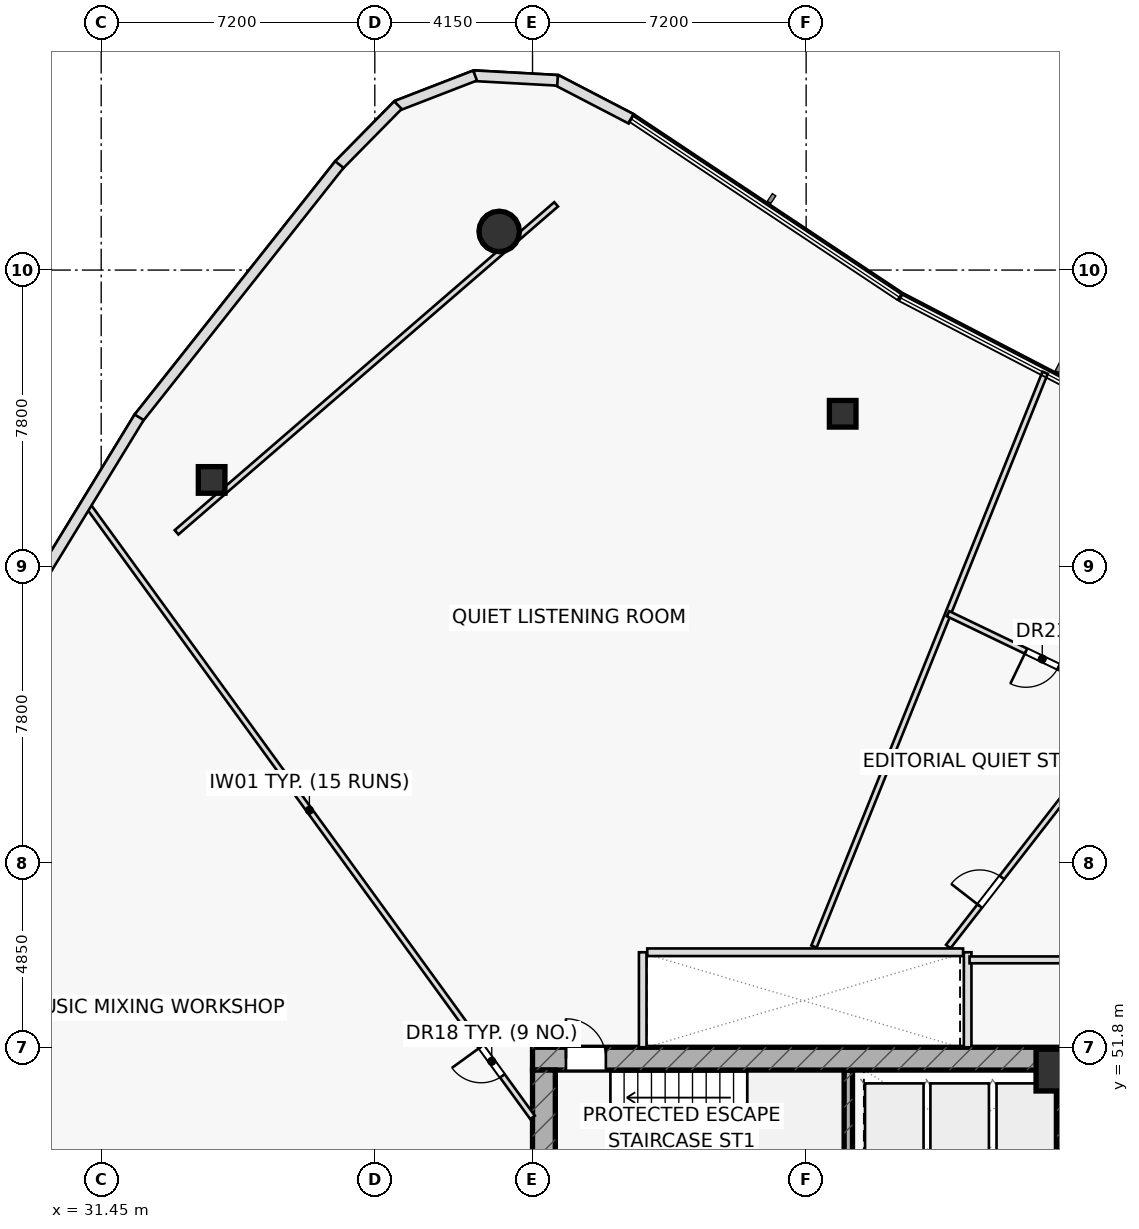
"""IFC4 building model, lengths in metres.
Left out: names, types, materials, properties, quantities, classifications, styles, units other than length and angle.
Written with IfcOpenShell. Run it as: python <this file> out.ifc"""

import sys

from ifc_helpers import new_model, si_unit, direction, frame, frame_2d, origin, origin_2d, place, context, subcontext, project, spatial, rectangle, hollow_rectangle, hollow_circle, extrude, element, fill, save


model = new_model("IFC4")
c1 = context("Model", 3, precision=1e-05, world=origin(), true_north=direction((0.0, 1.0)))
c2 = subcontext(c1, "Body", "Model", "MODEL_VIEW")
j1 = project(units=[si_unit("LENGTHUNIT", "METRE"), si_unit("PLANEANGLEUNIT", "RADIAN")], contexts=[c1])
p1 = place(None, origin())
s1 = spatial("IfcSite", under=j1, at=p1, CompositionType="ELEMENT")
p2 = place(p1, origin())
s2 = spatial("IfcBuilding", under=s1, at=p2, CompositionType="ELEMENT")
p3 = place(p2, frame((0.0, 0.0, 62.7)))
s3 = spatial("IfcBuildingStorey", under=s2, at=p3, CompositionType="ELEMENT", Elevation=62.7)
p4 = place(p3, frame((51.11, 48.1, 0.0), z_axis=(0.0, 0.0, 1.0), x_axis=(0.0, 1.0, 0.0)))
e1 = element("IfcWall", 1, at=p4, inside=s3, PredefinedType="SHEAR", context=c2, shape_type="SweptSolid", body=[
    extrude(rectangle(XDim=3.1, YDim=0.22, at=frame_2d((1.55, 0.0))), origin(), (0.0, 0.0, 1.0), 3.6),
])
p5 = place(p3, frame((42.8, 51.5, 0.0), z_axis=(0.0, 0.0, 1.0), x_axis=(1.0, 0.0, 0.0)))
e2 = element("IfcWall", 2, at=p5, inside=s3, PredefinedType="SHEAR", context=c2, shape_type="SweptSolid", body=[
    extrude(rectangle(XDim=14.4, YDim=0.6, at=frame_2d((7.2, 0.0))), origin(), (0.0, 0.0, 1.0), 3.6),
])
p6 = place(p5, frame((0.88, 0.0, 0.0)))
e3 = element("IfcOpeningElement", 3, at=p6, cuts=e2, PredefinedType="OPENING", context=c2, shape_type="SweptSolid", body=[
    extrude(rectangle(XDim=1.05, YDim=2.2, at=frame_2d((0.525, 1.1))), frame((0.0, 0.31, 0.0), z_axis=(0.0, -1.0, 0.0), x_axis=(1.0, 0.0, 0.0)), (0.0, 0.0, 1.0), 0.62),
])
p7 = place(p3, frame((43.1, 38.8, 0.0), z_axis=(0.0, 0.0, 1.0), x_axis=(0.0, 1.0, 0.0)))
e4 = element("IfcWall", 4, at=p7, inside=s3, PredefinedType="SHEAR", context=c2, shape_type="SweptSolid", body=[
    extrude(rectangle(XDim=12.4, YDim=0.6, at=frame_2d((6.2, 0.0))), origin(), (0.0, 0.0, 1.0), 3.6),
])
p8 = place(p3, frame((56.9, 38.8, 0.0), z_axis=(0.0, 0.0, 1.0), x_axis=(0.0, 1.0, 0.0)))
e5 = element("IfcWall", 5, at=p8, inside=s3, PredefinedType="SHEAR", context=c2, shape_type="SweptSolid", body=[
    extrude(rectangle(XDim=12.4, YDim=0.6, at=frame_2d((6.2, 0.0))), origin(), (0.0, 0.0, 1.0), 3.6),
])
p9 = place(p8, frame((3.85, 0.0, 0.0)))
e6 = element("IfcOpeningElement", 6, at=p9, cuts=e5, PredefinedType="OPENING", context=c2, shape_type="SweptSolid", body=[
    extrude(rectangle(XDim=1.5, YDim=2.2, at=frame_2d((0.75, 1.1))), frame((0.0, 0.31, 0.0), z_axis=(0.0, -1.0, 0.0), x_axis=(1.0, 0.0, 0.0)), (0.0, 0.0, 1.0), 0.62),
])
p10 = place(p3, frame((56.6, 51.2, 0.0), z_axis=(0.0, 0.0, 1.0), x_axis=(1.0, 0.0, 0.0)))
e7 = element("IfcColumn", 7, at=p10, inside=s3, PredefinedType="COLUMN", context=c2, shape_type="SweptSolid", body=[
    extrude(rectangle(XDim=1.1, YDim=1.1, at=origin_2d()), origin(), (0.0, 0.0, 1.0), 3.6),
])
p11 = place(p3, frame((41.923, 73.266, 0.0), z_axis=(0.0, 0.0, 1.0), x_axis=(1.0, 0.0, 0.0)))
e8 = element("IfcColumn", 8, at=p11, inside=s3, PredefinedType="COLUMN", context=c2, shape_type="SweptSolid", body=[
    extrude(hollow_circle(Radius=0.533, WallThickness=0.045, at=origin_2d()), origin(), (0.0, 0.0, 1.0), 3.6),
])
for number, where, z_axis, x_axis in (
    (9, (34.356, 66.728, 0.0), (0.0, 0.0, 1.0), (1.0, 0.0, 0.0)),
    (10, (50.962, 68.469, 0.0), (0.0, 0.0, 1.0), (1.0, 0.0, 0.0)),
):
    element("IfcColumn", number, at=place(p3, frame(where, z_axis=z_axis, x_axis=x_axis)), inside=s3, PredefinedType="COLUMN", context=c2, shape_type="SweptSolid", body=[
        extrude(hollow_rectangle(XDim=0.7, YDim=0.7, WallThickness=0.04, at=origin_2d()), origin(), (0.0, 0.0, 1.0), 3.6),
    ])
for number, where, z_axis, x_axis in (
    (11, (45.7, 51.8, 0.0), (0.0, 0.0, 1.0), (0.0, 1.0, 0.0)),
    (12, (54.25, 51.8, 0.0), (0.0, 0.0, 1.0), (0.0, 1.0, 0.0)),
):
    element("IfcWall", number, at=place(p3, frame(where, z_axis=z_axis, x_axis=x_axis)), inside=s3, PredefinedType="PARTITIONING", context=c2, shape_type="SweptSolid", body=[
        extrude(rectangle(XDim=2.5, YDim=0.2, at=frame_2d((1.25, 0.0))), origin(), (0.0, 0.0, 1.0), 3.6),
    ])
p12 = place(p3, frame((43.421, 73.979, 0.0), z_axis=(0.0, 0.0, 1.0), x_axis=(-0.756659135409, -0.653809569218, 0.0)))
e13 = element("IfcWall", 13, at=p12, inside=s3, PredefinedType="PARTITIONING", context=c2, shape_type="SweptSolid", body=[
    extrude(rectangle(XDim=13.2, YDim=0.15, at=frame_2d((6.6, 0.0))), origin(), (0.0, 0.0, 1.0), 2.975),
])
p13 = place(p3, frame((42.8, 49.955, 0.0), z_axis=(0.0, 0.0, 1.0), x_axis=(-0.587790891167, 0.809012897463, 0.0)))
e14 = element("IfcWall", 14, at=p13, inside=s3, PredefinedType="PARTITIONING", context=c2, shape_type="SweptSolid", body=[
    extrude(rectangle(XDim=19.979, YDim=0.15, at=frame_2d((9.989, 0.0))), origin(), (0.0, 0.0, 1.0), 2.975),
])
p14 = place(p13, frame((1.35, 0.0, 0.0)))
e15 = element("IfcOpeningElement", 15, at=p14, cuts=e14, PredefinedType="OPENING", context=c2, shape_type="SweptSolid", body=[
    extrude(rectangle(XDim=0.95, YDim=2.05, at=frame_2d((0.475, 1.025))), frame((0.0, 0.085, 0.0), z_axis=(0.0, -1.0, 0.0), x_axis=(1.0, 0.0, 0.0)), (0.0, 0.0, 1.0), 0.17),
])
p15 = place(p3, frame((53.74, 54.45, 0.0), z_axis=(0.0, 0.0, 1.0), x_axis=(0.613423233684, 0.78975435192, 0.0)))
e16 = element("IfcWall", 16, at=p15, inside=s3, PredefinedType="PARTITIONING", context=c2, shape_type="SweptSolid", body=[
    extrude(rectangle(XDim=13.92, YDim=0.15, at=frame_2d((6.96, 0.0))), origin(), (0.0, 0.0, 1.0), 2.975),
])
p16 = place(p15, frame((1.35, 0.0, 0.0)))
e17 = element("IfcOpeningElement", 17, at=p16, cuts=e16, PredefinedType="OPENING", context=c2, shape_type="SweptSolid", body=[
    extrude(rectangle(XDim=0.95, YDim=2.05, at=frame_2d((0.475, 1.025))), frame((0.0, 0.085, 0.0), z_axis=(0.0, -1.0, 0.0), x_axis=(1.0, 0.0, 0.0)), (0.0, 0.0, 1.0), 0.17),
])
p17 = place(p3, frame((50.207, 54.45, 0.0), z_axis=(0.0, 0.0, 1.0), x_axis=(0.373649555397, 0.927569948711, 0.0)))
e18 = element("IfcWall", 18, at=p17, inside=s3, PredefinedType="PARTITIONING", context=c2, shape_type="SweptSolid", body=[
    extrude(rectangle(XDim=16.279, YDim=0.15, at=frame_2d((8.139, 0.0))), origin(), (0.0, 0.0, 1.0), 2.975),
])
p18 = place(p3, frame((58.693, 60.826, 0.0), z_axis=(0.0, 0.0, 1.0), x_axis=(-0.901424681966, 0.432935956861, 0.0)))
e19 = element("IfcWall", 19, at=p18, inside=s3, PredefinedType="PARTITIONING", context=c2, shape_type="SweptSolid", body=[
    extrude(rectangle(XDim=5.5, YDim=0.15, at=frame_2d((2.75, 0.0))), origin(), (0.0, 0.0, 1.0), 2.975),
])
p19 = place(p18, frame((2.275, 0.0, 0.0)))
e20 = element("IfcOpeningElement", 20, at=p19, cuts=e19, PredefinedType="OPENING", context=c2, shape_type="SweptSolid", body=[
    extrude(rectangle(XDim=0.95, YDim=2.05, at=frame_2d((0.475, 1.025))), frame((0.0, 0.085, 0.0), z_axis=(0.0, -1.0, 0.0), x_axis=(1.0, 0.0, 0.0)), (0.0, 0.0, 1.0), 0.17),
])
p20 = place(p3, frame((54.3, 54.1, 0.0), z_axis=(0.0, 0.0, 1.0), x_axis=(1.0, 0.0, 0.0)))
e21 = element("IfcWall", 21, at=p20, inside=s3, PredefinedType="PARTITIONING", context=c2, shape_type="SweptSolid", body=[
    extrude(rectangle(XDim=5.25, YDim=0.18, at=frame_2d((2.625, 0.0))), origin(), (0.0, 0.0, 1.0), 2.975),
])
p21 = place(p3, frame((45.396, 76.229, 0.0), z_axis=(0.0, 0.0, 1.0), x_axis=(-0.88741889112, 0.46096389412, 0.0)))
e22 = element("IfcWall", 22, at=p21, inside=s3, PredefinedType="STANDARD", context=c2, shape_type="SweptSolid", body=[
    extrude(rectangle(XDim=2.214, YDim=0.28, at=frame_2d((1.107, 0.0))), origin(), (0.0, 0.0, 1.0), 3.6),
])
p22 = place(p3, frame((43.459, 77.242, 0.0), z_axis=(0.0, 0.0, 1.0), x_axis=(-0.998487852216, 0.054972802164, 0.0)))
e23 = element("IfcWall", 23, at=p22, inside=s3, PredefinedType="STANDARD", context=c2, shape_type="SweptSolid", body=[
    extrude(rectangle(XDim=2.203, YDim=0.28, at=frame_2d((1.102, 0.0))), origin(), (0.0, 0.0, 1.0), 3.6),
])
p23 = place(p3, frame((41.288, 77.368, 0.0), z_axis=(0.0, 0.0, 1.0), x_axis=(-0.932643913252, -0.360798186075, 0.0)))
e24 = element("IfcWall", 24, at=p23, inside=s3, PredefinedType="STANDARD", context=c2, shape_type="SweptSolid", body=[
    extrude(rectangle(XDim=2.203, YDim=0.28, at=frame_2d((1.101, 0.0))), origin(), (0.0, 0.0, 1.0), 3.6),
])
p24 = place(p3, frame((39.258, 76.59, 0.0), z_axis=(0.0, 0.0, 1.0), x_axis=(-0.70148940443, -0.712679882887, 0.0)))
e25 = element("IfcWall", 25, at=p24, inside=s3, PredefinedType="STANDARD", context=c2, shape_type="SweptSolid", body=[
    extrude(rectangle(XDim=2.225, YDim=0.28, at=frame_2d((1.113, 0.0))), origin(), (0.0, 0.0, 1.0), 3.6),
])
p25 = place(p3, frame((37.717, 75.026, 0.0), z_axis=(0.0, 0.0, 1.0), x_axis=(-0.620830009018, -0.783945214861, 0.0)))
e26 = element("IfcWall", 26, at=p25, inside=s3, PredefinedType="STANDARD", context=c2, shape_type="SweptSolid", body=[
    extrude(rectangle(XDim=8.513, YDim=0.28, at=frame_2d((4.257, 0.0))), origin(), (0.0, 0.0, 1.0), 3.6),
])
p26 = place(p3, frame((32.449, 68.376, 0.0), z_axis=(0.0, 0.0, 1.0), x_axis=(-0.521417484471, -0.853301709179, 0.0)))
e27 = element("IfcWall", 27, at=p26, inside=s3, PredefinedType="STANDARD", context=c2, shape_type="SweptSolid", body=[
    extrude(rectangle(XDim=8.501, YDim=0.28, at=frame_2d((4.251, 0.0))), origin(), (0.0, 0.0, 1.0), 3.6),
])
p27 = place(p3, frame((45.82, 54.3, 0.0), z_axis=(0.0, 0.0, 1.0), x_axis=(1.0, 0.0, 0.0)))
e28 = element("IfcWall", 28, at=p27, inside=s3, PredefinedType="PARTITIONING", context=c2, shape_type="SweptSolid", body=[
    extrude(rectangle(XDim=8.31, YDim=0.2, at=frame_2d((4.155, 0.0))), origin(), (0.0, 0.0, 1.0), 3.6),
])
p28 = place(p6, origin())
e29 = element("IfcDoor", 29, at=p28, inside=s3, OperationType="SINGLE_SWING_LEFT", PredefinedType="DOOR", context=c2, shape_type="SweptSolid", body=[
    extrude(rectangle(XDim=1.05, YDim=2.2, at=frame_2d((0.525, 1.1))), frame((0.0, 0.025, 0.0), z_axis=(0.0, -1.0, 0.0), x_axis=(1.0, 0.0, 0.0)), (0.0, 0.0, 1.0), 0.05),
])
fill(e3, e29)
p29 = place(p14, origin())
e30 = element("IfcDoor", 30, at=p29, inside=s3, OperationType="SINGLE_SWING_RIGHT", PredefinedType="DOOR", context=c2, shape_type="SweptSolid", body=[
    extrude(rectangle(XDim=0.95, YDim=2.05, at=frame_2d((0.475, 1.025))), frame((0.0, 0.025, 0.0), z_axis=(0.0, -1.0, 0.0), x_axis=(1.0, 0.0, 0.0)), (0.0, 0.0, 1.0), 0.05),
])
fill(e15, e30)
p30 = place(p16, origin())
e31 = element("IfcDoor", 31, at=p30, inside=s3, OperationType="SINGLE_SWING_LEFT", PredefinedType="DOOR", context=c2, shape_type="SweptSolid", body=[
    extrude(rectangle(XDim=0.95, YDim=2.05, at=frame_2d((0.475, 1.025))), frame((0.0, 0.025, 0.0), z_axis=(0.0, -1.0, 0.0), x_axis=(1.0, 0.0, 0.0)), (0.0, 0.0, 1.0), 0.05),
])
fill(e17, e31)
p31 = place(p19, origin())
e32 = element("IfcDoor", 32, at=p31, inside=s3, OperationType="SINGLE_SWING_RIGHT", PredefinedType="DOOR", context=c2, shape_type="SweptSolid", body=[
    extrude(rectangle(XDim=0.95, YDim=2.05, at=frame_2d((0.475, 1.025))), frame((0.0, 0.025, 0.0), z_axis=(0.0, -1.0, 0.0), x_axis=(1.0, 0.0, 0.0)), (0.0, 0.0, 1.0), 0.05),
])
fill(e20, e32)
save(model, sys.argv[1])
